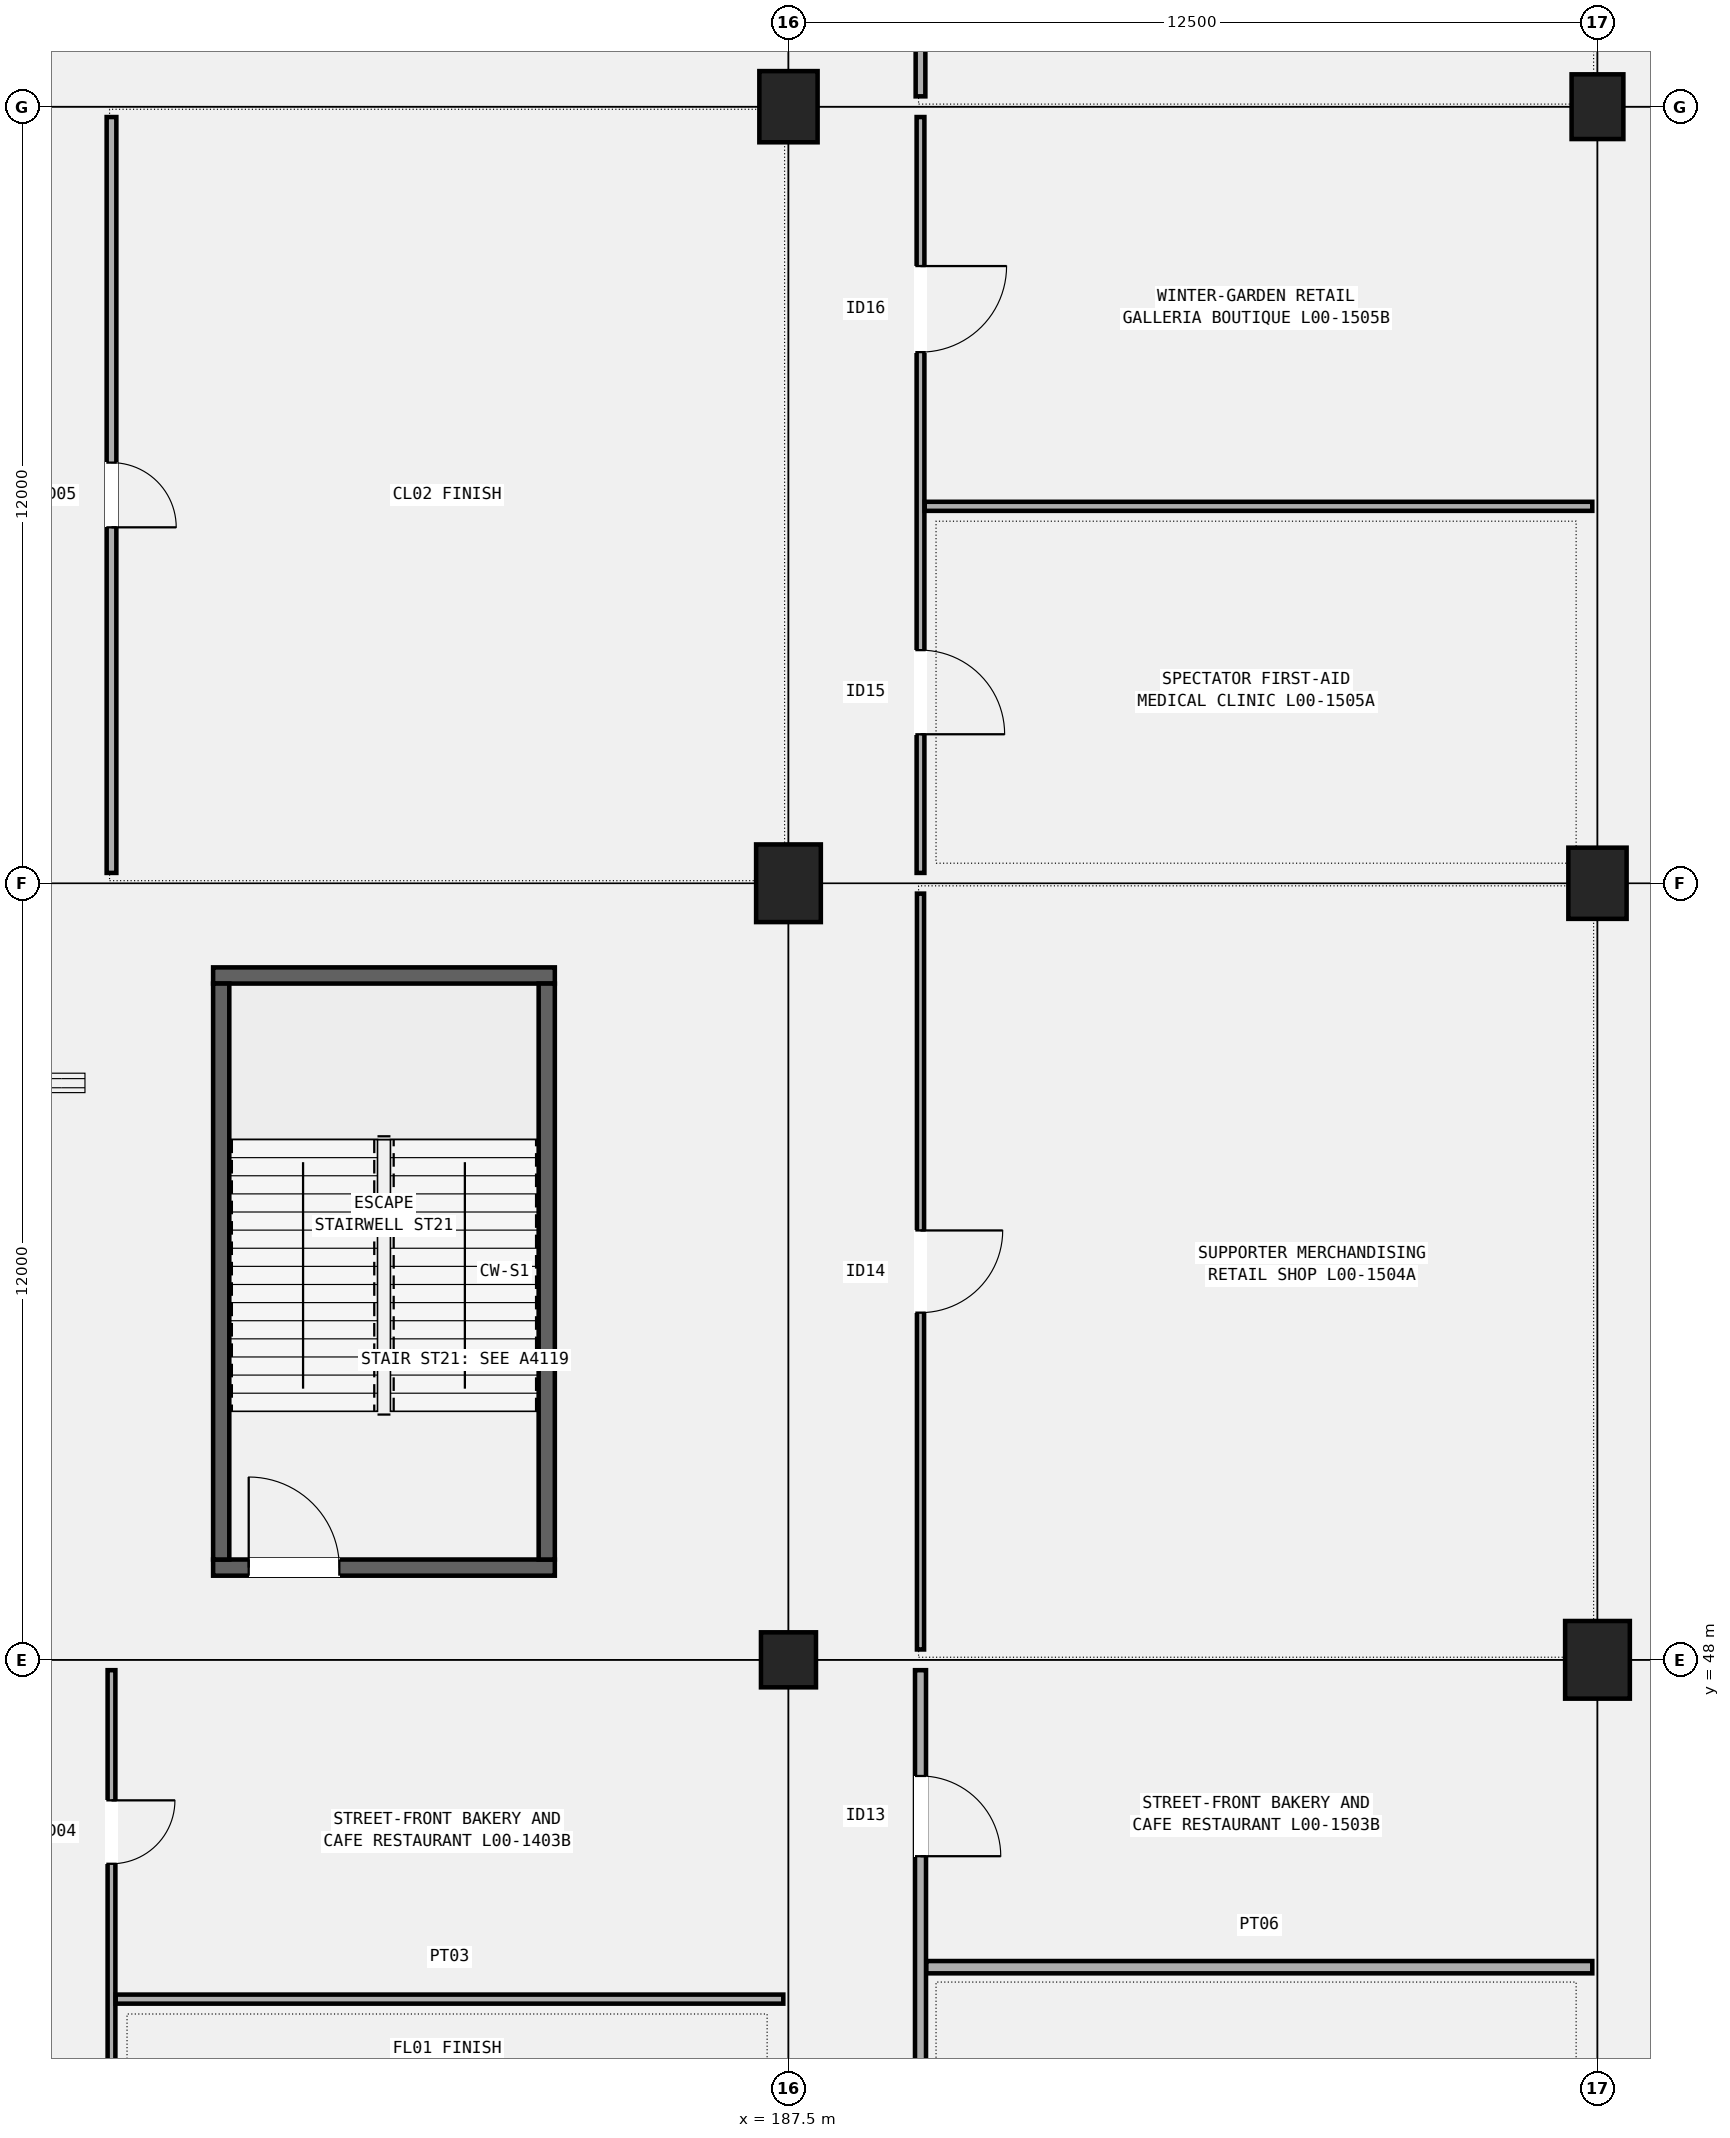
"""IFC4 building model, lengths in metres.
Left out: names, types, materials, properties, quantities, classifications, styles, units other than length and angle.
Written with IfcOpenShell. Run it as: python <this file> out.ifc"""

import sys

from ifc_helpers import new_model, si_unit, direction, frame, frame_2d, origin, origin_2d, place, context, subcontext, project, spatial, rectangle, circle, extrude, element, fill, save


model = new_model("IFC4")
c1 = context("Model", 3, precision=1e-05, world=origin(), true_north=direction((0.0, 1.0)))
c2 = subcontext(c1, "Body", "Model", "MODEL_VIEW")
j1 = project(units=[si_unit("LENGTHUNIT", "METRE"), si_unit("PLANEANGLEUNIT", "RADIAN")], contexts=[c1])
p1 = place(None, origin())
s1 = spatial("IfcSite", under=j1, at=p1, CompositionType="ELEMENT")
p2 = place(p1, origin())
s2 = spatial("IfcBuilding", under=s1, at=p2, CompositionType="ELEMENT")
p3 = place(p2, origin())
s3 = spatial("IfcBuildingStorey", under=s2, at=p3, CompositionType="ELEMENT", Elevation=0.0)
p4 = place(p3, frame((187.5, 48.0, 0.0), z_axis=(0.0, 0.0, 1.0), x_axis=(1.0, 0.0, 0.0)))
e1 = element("IfcColumn", 1, at=p4, inside=s3, PredefinedType="COLUMN", context=c2, shape_type="SweptSolid", body=[
    extrude(circle(Radius=0.425, at=origin_2d()), origin(), (0.0, 0.0, 1.0), 5.4),
])
p5 = place(p3, frame((187.5, 60.0, 0.0), z_axis=(0.0, 0.0, 1.0), x_axis=(1.0, 0.0, 0.0)))
e2 = element("IfcColumn", 2, at=p5, inside=s3, PredefinedType="COLUMN", context=c2, shape_type="SweptSolid", body=[
    extrude(rectangle(XDim=1.0, YDim=1.2, at=origin_2d()), origin(), (0.0, 0.0, 1.0), 5.4),
])
p6 = place(p3, frame((187.5, 72.0, 0.0), z_axis=(0.0, 0.0, 1.0), x_axis=(1.0, 0.0, 0.0)))
e3 = element("IfcColumn", 3, at=p6, inside=s3, PredefinedType="COLUMN", context=c2, shape_type="SweptSolid", body=[
    extrude(rectangle(XDim=0.9, YDim=1.1, at=origin_2d()), origin(), (0.0, 0.0, 1.0), 5.4),
])
p7 = place(p3, frame((200.0, 48.0, 0.0), z_axis=(0.0, 0.0, 1.0), x_axis=(1.0, 0.0, 0.0)))
e4 = element("IfcColumn", 4, at=p7, inside=s3, PredefinedType="COLUMN", context=c2, shape_type="SweptSolid", body=[
    extrude(rectangle(XDim=1.0, YDim=1.2, at=origin_2d()), origin(), (0.0, 0.0, 1.0), 5.4),
])
p8 = place(p3, frame((200.0, 60.0, 0.0), z_axis=(0.0, 0.0, 1.0), x_axis=(1.0, 0.0, 0.0)))
e5 = element("IfcColumn", 5, at=p8, inside=s3, PredefinedType="COLUMN", context=c2, shape_type="SweptSolid", body=[
    extrude(rectangle(XDim=0.9, YDim=1.1, at=origin_2d()), origin(), (0.0, 0.0, 1.0), 5.4),
])
p9 = place(p3, frame((200.0, 72.0, 0.0), z_axis=(0.0, 0.0, 1.0), x_axis=(1.0, 0.0, 0.0)))
e6 = element("IfcColumn", 6, at=p9, inside=s3, PredefinedType="COLUMN", context=c2, shape_type="SweptSolid", body=[
    extrude(rectangle(XDim=0.8, YDim=1.0, at=origin_2d()), origin(), (0.0, 0.0, 1.0), 5.4),
])
p10 = place(p3, frame((178.61, 49.425, 0.0), z_axis=(0.0, 0.0, 1.0), x_axis=(1.0, 0.0, 0.0)))
e7 = element("IfcWall", 7, at=p10, inside=s3, PredefinedType="SHEAR", context=c2, shape_type="SweptSolid", body=[
    extrude(rectangle(XDim=5.28, YDim=0.25, at=frame_2d((2.64, 0.0))), origin(), (0.0, 0.0, 1.0), 5.14),
])
p11 = place(p10, frame((0.55, 0.0, 0.0)))
e8 = element("IfcOpeningElement", 8, at=p11, cuts=e7, PredefinedType="OPENING", context=c2, shape_type="SweptSolid", body=[
    extrude(rectangle(XDim=1.4, YDim=2.15, at=frame_2d((0.7, 1.075))), frame((0.0, 0.135, 0.0), z_axis=(0.0, -1.0, 0.0), x_axis=(1.0, 0.0, 0.0)), (0.0, 0.0, 1.0), 0.27),
])
p12 = place(p3, frame((178.61, 58.575, 0.0), z_axis=(0.0, 0.0, 1.0), x_axis=(1.0, 0.0, 0.0)))
e9 = element("IfcWall", 9, at=p12, inside=s3, PredefinedType="SHEAR", context=c2, shape_type="SweptSolid", body=[
    extrude(rectangle(XDim=5.28, YDim=0.25, at=frame_2d((2.64, 0.0))), origin(), (0.0, 0.0, 1.0), 5.14),
])
for number, where, z_axis, x_axis in (
    (10, (178.735, 49.55, 0.0), (0.0, 0.0, 1.0), (0.0, 1.0, 0.0)),
    (11, (183.765, 49.55, 0.0), (0.0, 0.0, 1.0), (0.0, 1.0, 0.0)),
):
    element("IfcWall", number, at=place(p3, frame(where, z_axis=z_axis, x_axis=x_axis)), inside=s3, PredefinedType="SHEAR", context=c2, shape_type="SweptSolid", body=[
        extrude(rectangle(XDim=8.9, YDim=0.25, at=frame_2d((4.45, 0.0))), origin(), (0.0, 0.0, 1.0), 5.14),
    ])
p13 = place(p3, frame((177.04, 37.97, 0.0), z_axis=(0.0, 0.0, 1.0), x_axis=(0.0, 1.0, 0.0)))
e12 = element("IfcWall", 12, at=p13, inside=s3, PredefinedType="PARTITIONING", context=c2, shape_type="SweptSolid", body=[
    extrude(rectangle(XDim=9.87, YDim=0.12, at=frame_2d((4.935, 0.0))), origin(), (0.0, 0.0, 1.0), 4.52),
])
p14 = place(p13, frame((2.828, 0.0, 0.0), z_axis=(0.0, 0.0, 1.0), x_axis=(-1.0, 0.0, 0.0)))
e13 = element("IfcOpeningElement", 13, at=p14, cuts=e12, PredefinedType="OPENING", context=c2, shape_type="SweptSolid", body=[
    extrude(rectangle(XDim=0.95, YDim=2.12, at=frame_2d((0.475, 1.06))), frame((0.0, 0.07, 0.0), z_axis=(0.0, -1.0, 0.0), x_axis=(1.0, 0.0, 0.0)), (0.0, 0.0, 1.0), 0.14),
])
p15 = place(p13, frame((7.858, 0.0, 0.0), z_axis=(0.0, 0.0, 1.0), x_axis=(-1.0, 0.0, 0.0)))
e14 = element("IfcOpeningElement", 14, at=p15, cuts=e12, PredefinedType="OPENING", context=c2, shape_type="SweptSolid", body=[
    extrude(rectangle(XDim=0.98, YDim=2.1, at=frame_2d((0.49, 1.05))), frame((0.0, 0.07, 0.0), z_axis=(0.0, -1.0, 0.0), x_axis=(1.0, 0.0, 0.0)), (0.0, 0.0, 1.0), 0.14),
])
p16 = place(p3, frame((177.105, 42.757, 0.0), z_axis=(0.0, 0.0, 1.0), x_axis=(1.0, 0.0, 0.0)))
e15 = element("IfcWall", 15, at=p16, inside=s3, PredefinedType="PARTITIONING", context=c2, shape_type="SweptSolid", body=[
    extrude(rectangle(XDim=10.315, YDim=0.14, at=frame_2d((5.157, 0.0))), origin(), (0.0, 0.0, 1.0), 4.52),
])
p17 = place(p3, frame((177.04, 60.16, 0.0), z_axis=(0.0, 0.0, 1.0), x_axis=(0.0, 1.0, 0.0)))
e16 = element("IfcWall", 16, at=p17, inside=s3, PredefinedType="PARTITIONING", context=c2, shape_type="SweptSolid", body=[
    extrude(rectangle(XDim=11.68, YDim=0.15, at=frame_2d((5.84, 0.0))), origin(), (0.0, 0.0, 1.0), 4.52),
])
p18 = place(p17, frame((6.34, 0.0, 0.0), z_axis=(0.0, 0.0, 1.0), x_axis=(-1.0, 0.0, 0.0)))
e17 = element("IfcOpeningElement", 17, at=p18, cuts=e16, PredefinedType="OPENING", context=c2, shape_type="SweptSolid", body=[
    extrude(rectangle(XDim=1.0, YDim=2.14, at=frame_2d((0.5, 1.07))), frame((0.0, 0.085, 0.0), z_axis=(0.0, -1.0, 0.0), x_axis=(1.0, 0.0, 0.0)), (0.0, 0.0, 1.0), 0.17),
])
p19 = place(p3, frame((189.54, 37.97, 0.0), z_axis=(0.0, 0.0, 1.0), x_axis=(0.0, 1.0, 0.0)))
e18 = element("IfcWall", 18, at=p19, inside=s3, PredefinedType="PARTITIONING", context=c2, shape_type="SweptSolid", body=[
    extrude(rectangle(XDim=9.87, YDim=0.17, at=frame_2d((4.935, 0.0))), origin(), (0.0, 0.0, 1.0), 4.52),
])
p20 = place(p19, frame((3.205, 0.0, 0.0), z_axis=(0.0, 0.0, 1.0), x_axis=(-1.0, 0.0, 0.0)))
e19 = element("IfcOpeningElement", 19, at=p20, cuts=e18, PredefinedType="OPENING", context=c2, shape_type="SweptSolid", body=[
    extrude(rectangle(XDim=1.21, YDim=2.18, at=frame_2d((0.605, 1.09))), frame((0.0, 0.095, 0.0), z_axis=(0.0, -1.0, 0.0), x_axis=(1.0, 0.0, 0.0)), (0.0, 0.0, 1.0), 0.19),
])
p21 = place(p19, frame((8.235, 0.0, 0.0), z_axis=(0.0, 0.0, 1.0), x_axis=(-1.0, 0.0, 0.0)))
e20 = element("IfcOpeningElement", 20, at=p21, cuts=e18, PredefinedType="OPENING", context=c2, shape_type="SweptSolid", body=[
    extrude(rectangle(XDim=1.24, YDim=2.22, at=frame_2d((0.62, 1.11))), frame((0.0, 0.095, 0.0), z_axis=(0.0, -1.0, 0.0), x_axis=(1.0, 0.0, 0.0)), (0.0, 0.0, 1.0), 0.19),
])
p22 = place(p3, frame((189.63, 43.25, 0.0), z_axis=(0.0, 0.0, 1.0), x_axis=(1.0, 0.0, 0.0)))
e21 = element("IfcWall", 21, at=p22, inside=s3, PredefinedType="PARTITIONING", context=c2, shape_type="SweptSolid", body=[
    extrude(rectangle(XDim=10.29, YDim=0.19, at=frame_2d((5.145, 0.0))), origin(), (0.0, 0.0, 1.0), 4.52),
])
p23 = place(p3, frame((189.54, 48.16, 0.0), z_axis=(0.0, 0.0, 1.0), x_axis=(0.0, 1.0, 0.0)))
e22 = element("IfcWall", 22, at=p23, inside=s3, PredefinedType="PARTITIONING", context=c2, shape_type="SweptSolid", body=[
    extrude(rectangle(XDim=11.68, YDim=0.11, at=frame_2d((5.84, 0.0))), origin(), (0.0, 0.0, 1.0), 4.52),
])
p24 = place(p23, frame((6.475, 0.0, 0.0), z_axis=(0.0, 0.0, 1.0), x_axis=(-1.0, 0.0, 0.0)))
e23 = element("IfcOpeningElement", 23, at=p24, cuts=e22, PredefinedType="OPENING", context=c2, shape_type="SweptSolid", body=[
    extrude(rectangle(XDim=1.27, YDim=2.2, at=frame_2d((0.635, 1.1))), frame((0.0, 0.065, 0.0), z_axis=(0.0, -1.0, 0.0), x_axis=(1.0, 0.0, 0.0)), (0.0, 0.0, 1.0), 0.13),
])
p25 = place(p3, frame((189.54, 60.16, 0.0), z_axis=(0.0, 0.0, 1.0), x_axis=(0.0, 1.0, 0.0)))
e24 = element("IfcWall", 24, at=p25, inside=s3, PredefinedType="PARTITIONING", context=c2, shape_type="SweptSolid", body=[
    extrude(rectangle(XDim=11.68, YDim=0.12, at=frame_2d((5.84, 0.0))), origin(), (0.0, 0.0, 1.0), 4.52),
])
p26 = place(p25, frame((3.442, 0.0, 0.0), z_axis=(0.0, 0.0, 1.0), x_axis=(-1.0, 0.0, 0.0)))
e25 = element("IfcOpeningElement", 25, at=p26, cuts=e24, PredefinedType="OPENING", context=c2, shape_type="SweptSolid", body=[
    extrude(rectangle(XDim=1.3, YDim=2.24, at=frame_2d((0.65, 1.12))), frame((0.0, 0.07, 0.0), z_axis=(0.0, -1.0, 0.0), x_axis=(1.0, 0.0, 0.0)), (0.0, 0.0, 1.0), 0.14),
])
p27 = place(p25, frame((9.377, 0.0, 0.0), z_axis=(0.0, 0.0, 1.0), x_axis=(-1.0, 0.0, 0.0)))
e26 = element("IfcOpeningElement", 26, at=p27, cuts=e24, PredefinedType="OPENING", context=c2, shape_type="SweptSolid", body=[
    extrude(rectangle(XDim=1.33, YDim=2.22, at=frame_2d((0.665, 1.11))), frame((0.0, 0.07, 0.0), z_axis=(0.0, -1.0, 0.0), x_axis=(1.0, 0.0, 0.0)), (0.0, 0.0, 1.0), 0.14),
])
p28 = place(p3, frame((189.605, 65.825, 0.0), z_axis=(0.0, 0.0, 1.0), x_axis=(1.0, 0.0, 0.0)))
e27 = element("IfcWall", 27, at=p28, inside=s3, PredefinedType="PARTITIONING", context=c2, shape_type="SweptSolid", body=[
    extrude(rectangle(XDim=10.315, YDim=0.14, at=frame_2d((5.157, 0.0))), origin(), (0.0, 0.0, 1.0), 4.52),
])
p29 = place(p3, frame((189.54, 72.16, 0.0), z_axis=(0.0, 0.0, 1.0), x_axis=(0.0, 1.0, 0.0)))
e28 = element("IfcWall", 28, at=p29, inside=s3, PredefinedType="PARTITIONING", context=c2, shape_type="SweptSolid", body=[
    extrude(rectangle(XDim=11.68, YDim=0.15, at=frame_2d((5.84, 0.0))), origin(), (0.0, 0.0, 1.0), 4.52),
])
p30 = place(p29, frame((6.52, 0.0, 0.0), z_axis=(0.0, 0.0, 1.0), x_axis=(-1.0, 0.0, 0.0)))
e29 = element("IfcOpeningElement", 29, at=p30, cuts=e28, PredefinedType="OPENING", context=c2, shape_type="SweptSolid", body=[
    extrude(rectangle(XDim=1.36, YDim=2.25, at=frame_2d((0.68, 1.125))), frame((0.0, 0.085, 0.0), z_axis=(0.0, -1.0, 0.0), x_axis=(1.0, 0.0, 0.0)), (0.0, 0.0, 1.0), 0.17),
])
p31 = place(p11, origin())
e30 = element("IfcDoor", 30, at=p31, inside=s3, OperationType="SINGLE_SWING_LEFT", PredefinedType="DOOR", context=c2, shape_type="SweptSolid", body=[
    extrude(rectangle(XDim=1.4, YDim=2.15, at=frame_2d((0.7, 1.075))), frame((0.0, 0.025, 0.0), z_axis=(0.0, -1.0, 0.0), x_axis=(1.0, 0.0, 0.0)), (0.0, 0.0, 1.0), 0.05),
])
fill(e8, e30)
p32 = place(p15, origin())
e31 = element("IfcDoor", 31, at=p32, inside=s3, OperationType="SINGLE_SWING_LEFT", PredefinedType="DOOR", context=c2, shape_type="SweptSolid", body=[
    extrude(rectangle(XDim=0.98, YDim=2.1, at=frame_2d((0.49, 1.05))), frame((0.0, 0.025, 0.0), z_axis=(0.0, -1.0, 0.0), x_axis=(1.0, 0.0, 0.0)), (0.0, 0.0, 1.0), 0.05),
])
fill(e14, e31)
p33 = place(p18, origin())
e32 = element("IfcDoor", 32, at=p33, inside=s3, OperationType="SINGLE_SWING_RIGHT", PredefinedType="DOOR", context=c2, shape_type="SweptSolid", body=[
    extrude(rectangle(XDim=1.0, YDim=2.14, at=frame_2d((0.5, 1.07))), frame((0.0, 0.025, 0.0), z_axis=(0.0, -1.0, 0.0), x_axis=(1.0, 0.0, 0.0)), (0.0, 0.0, 1.0), 0.05),
])
fill(e17, e32)
p34 = place(p21, origin())
e33 = element("IfcDoor", 33, at=p34, inside=s3, OperationType="SINGLE_SWING_RIGHT", PredefinedType="DOOR", context=c2, shape_type="SweptSolid", body=[
    extrude(rectangle(XDim=1.24, YDim=2.22, at=frame_2d((0.62, 1.11))), frame((0.0, 0.025, 0.0), z_axis=(0.0, -1.0, 0.0), x_axis=(1.0, 0.0, 0.0)), (0.0, 0.0, 1.0), 0.05),
])
fill(e20, e33)
p35 = place(p24, origin())
e34 = element("IfcDoor", 34, at=p35, inside=s3, OperationType="SINGLE_SWING_LEFT", PredefinedType="DOOR", context=c2, shape_type="SweptSolid", body=[
    extrude(rectangle(XDim=1.27, YDim=2.2, at=frame_2d((0.635, 1.1))), frame((0.0, 0.025, 0.0), z_axis=(0.0, -1.0, 0.0), x_axis=(1.0, 0.0, 0.0)), (0.0, 0.0, 1.0), 0.05),
])
fill(e23, e34)
p36 = place(p26, origin())
e35 = element("IfcDoor", 35, at=p36, inside=s3, OperationType="SINGLE_SWING_RIGHT", PredefinedType="DOOR", context=c2, shape_type="SweptSolid", body=[
    extrude(rectangle(XDim=1.3, YDim=2.24, at=frame_2d((0.65, 1.12))), frame((0.0, 0.025, 0.0), z_axis=(0.0, -1.0, 0.0), x_axis=(1.0, 0.0, 0.0)), (0.0, 0.0, 1.0), 0.05),
])
fill(e25, e35)
p37 = place(p27, origin())
e36 = element("IfcDoor", 36, at=p37, inside=s3, OperationType="SINGLE_SWING_LEFT", PredefinedType="DOOR", context=c2, shape_type="SweptSolid", body=[
    extrude(rectangle(XDim=1.33, YDim=2.22, at=frame_2d((0.665, 1.11))), frame((0.0, 0.025, 0.0), z_axis=(0.0, -1.0, 0.0), x_axis=(1.0, 0.0, 0.0)), (0.0, 0.0, 1.0), 0.05),
])
fill(e26, e36)
save(model, sys.argv[1])
